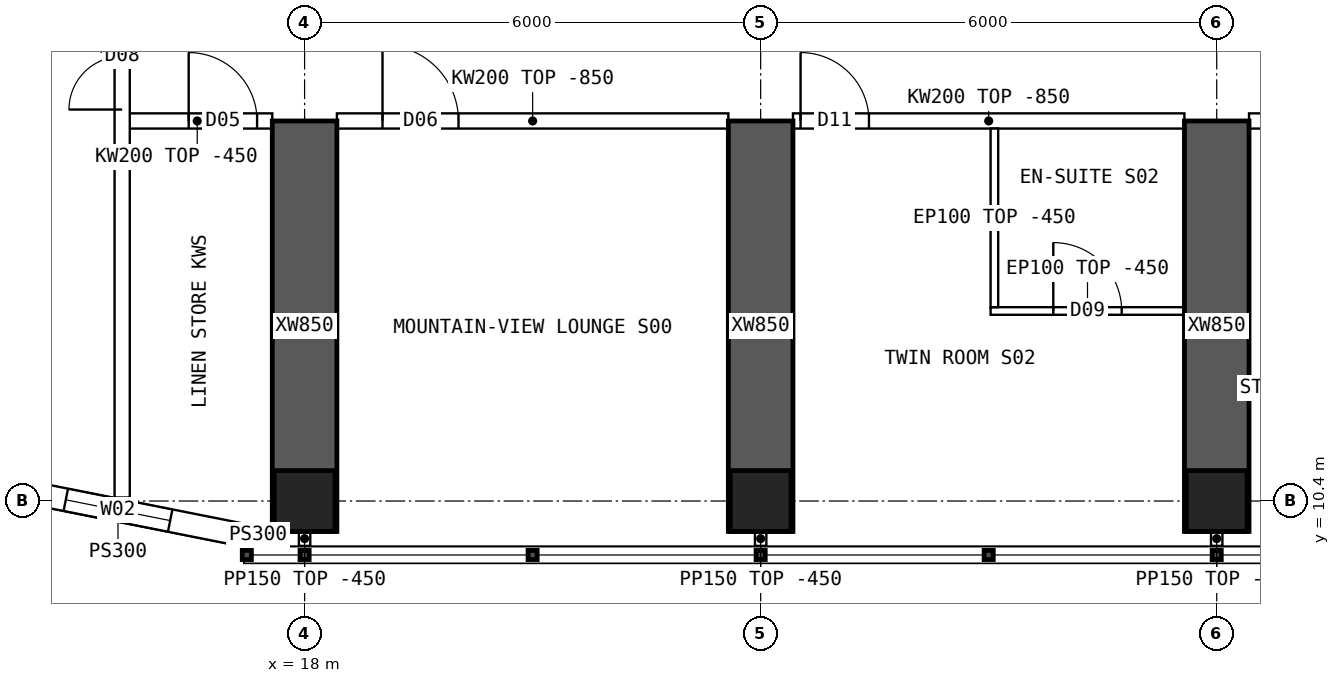
"""IFC4 building model, lengths in metres.
Left out: names, types, materials, properties, quantities, classifications, styles, units other than length and angle.
Written with IfcOpenShell. Run it as: python <this file> out.ifc"""

import sys

from ifc_helpers import new_model, si_unit, direction, frame, frame_2d, origin, origin_2d, place, context, subcontext, project, spatial, polyline, rectangle, hollow_rectangle, outline, extrude, element, fill, save


model = new_model("IFC4")
c1 = context("Model", 3, precision=1e-05, world=origin(), true_north=direction((0.0, 1.0)))
c2 = subcontext(c1, "Body", "Model", "MODEL_VIEW")
j1 = project(units=[si_unit("LENGTHUNIT", "METRE"), si_unit("PLANEANGLEUNIT", "RADIAN")], contexts=[c1])
p1 = place(None, origin())
s1 = spatial("IfcSite", under=j1, at=p1, CompositionType="ELEMENT")
p2 = place(p1, origin())
s2 = spatial("IfcBuilding", under=s1, at=p2, CompositionType="ELEMENT")
p3 = place(p2, frame((0.0, 0.0, 144.85)))
s3 = spatial("IfcBuildingStorey", under=s2, at=p3, CompositionType="ELEMENT", Elevation=144.85)
for number, where, z_axis, x_axis in (
    (1, (18.0, 10.4, 0.0), (0.0, 0.0, 1.0), (1.0, 0.0, 0.0)),
    (2, (24.0, 10.4, 0.0), (0.0, 0.0, 1.0), (1.0, 0.0, 0.0)),
    (3, (30.0, 10.4, 0.0), (0.0, 0.0, 1.0), (1.0, 0.0, 0.0)),
):
    element("IfcColumn", number, at=place(p3, frame(where, z_axis=z_axis, x_axis=x_axis)), inside=s3, PredefinedType="COLUMN", context=c2, shape_type="SweptSolid", body=[
        extrude(hollow_rectangle(XDim=0.8, YDim=0.8, WallThickness=0.08, at=origin_2d()), origin(), (0.0, 0.0, 1.0), 3.75),
    ])
for number, where, z_axis, x_axis in (
    (4, (18.0, 10.0, 0.0), (0.0, 0.0, 1.0), (0.0, 1.0, 0.0)),
    (5, (24.0, 10.0, 0.0), (0.0, 0.0, 1.0), (0.0, 1.0, 0.0)),
    (6, (30.0, 10.0, 0.0), (0.0, 0.0, 1.0), (0.0, 1.0, 0.0)),
):
    element("IfcWall", number, at=place(p3, frame(where, z_axis=z_axis, x_axis=x_axis)), inside=s3, PredefinedType="SHEAR", context=c2, shape_type="SweptSolid", body=[
        extrude(rectangle(XDim=5.4, YDim=0.85, at=frame_2d((2.7, 0.0))), origin(), (0.0, 0.0, 1.0), 3.75),
    ])
p4 = place(p3, frame((13.89, 10.608, 0.0), z_axis=(0.0, 0.0, 1.0), x_axis=(0.98078325777, -0.195100490205, 0.0)))
e7 = element("IfcWall", 7, at=p4, inside=s3, PredefinedType="SOLIDWALL", context=c2, shape_type="SweptSolid", body=[
    extrude(outline(polyline([(-0.03, -0.15), (3.405, -0.15), (3.345, 0.15), (0.03, 0.15), (-0.03, -0.15)])), origin(), (0.0, 0.0, 1.0), 3.3),
])
p5 = place(p4, frame((0.988, 0.0, 0.9)))
e8 = element("IfcOpeningElement", 8, at=p5, cuts=e7, PredefinedType="OPENING", context=c2, shape_type="SweptSolid", body=[
    extrude(rectangle(XDim=1.4, YDim=1.8, at=frame_2d((0.7, 0.9))), frame((0.0, 0.16, 0.0), z_axis=(0.0, -1.0, 0.0), x_axis=(1.0, 0.0, 0.0)), (0.0, 0.0, 1.0), 0.32),
])
p6 = place(p3, frame((17.2, 9.95, 0.0), z_axis=(0.0, 0.0, 1.0), x_axis=(1.0, 0.0, 0.0)))
e9 = element("IfcWall", 9, at=p6, inside=s3, PredefinedType="SOLIDWALL", context=c2, shape_type="SweptSolid", body=[
    extrude(rectangle(XDim=0.375, YDim=0.3, at=frame_2d((0.188, 0.0))), origin(), (0.0, 0.0, 1.0), 3.3),
])
p7 = place(p3, frame((15.6, 15.4, 0.0), z_axis=(0.0, 0.0, 1.0), x_axis=(1.0, 0.0, 0.0)))
e10 = element("IfcWall", 10, at=p7, inside=s3, PredefinedType="SOLIDWALL", context=c2, shape_type="SweptSolid", body=[
    extrude(rectangle(XDim=1.975, YDim=0.2, at=frame_2d((0.987, 0.0))), origin(), (0.0, 0.0, 1.0), 3.3),
])
p8 = place(p7, frame((0.875, 0.0, 0.0)))
e11 = element("IfcOpeningElement", 11, at=p8, cuts=e10, PredefinedType="OPENING", context=c2, shape_type="SweptSolid", body=[
    extrude(rectangle(XDim=0.9, YDim=2.1, at=frame_2d((0.45, 1.05))), frame((0.0, 0.11, 0.0), z_axis=(0.0, -1.0, 0.0), x_axis=(1.0, 0.0, 0.0)), (0.0, 0.0, 1.0), 0.22),
])
p9 = place(p3, frame((18.425, 15.4, 0.0), z_axis=(0.0, 0.0, 1.0), x_axis=(1.0, 0.0, 0.0)))
e12 = element("IfcWall", 12, at=p9, inside=s3, PredefinedType="SOLIDWALL", context=c2, shape_type="SweptSolid", body=[
    extrude(outline(polyline([(0.0, 0.0), (5.15, 0.0), (5.15, 2.9), (0.0, 2.9), (0.0, 0.0)])), frame((0.0, 0.1, 0.0), z_axis=(0.0, -1.0, 0.0), x_axis=(1.0, 0.0, 0.0)), (0.0, 0.0, 1.0), 0.2),
])
p10 = place(p9, frame((0.6, 0.0, 0.0)))
e13 = element("IfcOpeningElement", 13, at=p10, cuts=e12, PredefinedType="OPENING", context=c2, shape_type="SweptSolid", body=[
    extrude(rectangle(XDim=1.0, YDim=2.1, at=frame_2d((0.5, 1.05))), frame((0.0, 0.11, 0.0), z_axis=(0.0, -1.0, 0.0), x_axis=(1.0, 0.0, 0.0)), (0.0, 0.0, 1.0), 0.22),
])
p11 = place(p3, frame((24.425, 15.4, 0.0), z_axis=(0.0, 0.0, 1.0), x_axis=(1.0, 0.0, 0.0)))
e14 = element("IfcWall", 14, at=p11, inside=s3, PredefinedType="SOLIDWALL", context=c2, shape_type="SweptSolid", body=[
    extrude(outline(polyline([(0.0, 0.0), (5.15, 0.0), (5.15, 2.9), (0.0, 2.9), (0.0, 0.0)])), frame((0.0, 0.1, 0.0), z_axis=(0.0, -1.0, 0.0), x_axis=(1.0, 0.0, 0.0)), (0.0, 0.0, 1.0), 0.2),
])
p12 = place(p11, frame((0.1, 0.0, 0.0)))
e15 = element("IfcOpeningElement", 15, at=p12, cuts=e14, PredefinedType="OPENING", context=c2, shape_type="SweptSolid", body=[
    extrude(rectangle(XDim=0.9, YDim=2.1, at=frame_2d((0.45, 1.05))), frame((0.0, 0.11, 0.0), z_axis=(0.0, -1.0, 0.0), x_axis=(1.0, 0.0, 0.0)), (0.0, 0.0, 1.0), 0.22),
])
p13 = place(p3, frame((30.425, 15.4, 0.0), z_axis=(0.0, 0.0, 1.0), x_axis=(1.0, 0.0, 0.0)))
e16 = element("IfcWall", 16, at=p13, inside=s3, PredefinedType="SOLIDWALL", context=c2, shape_type="SweptSolid", body=[
    extrude(outline(polyline([(0.0, 0.0), (5.15, 0.0), (5.15, 2.9), (0.0, 2.9), (0.0, 0.0)])), frame((0.0, 0.1, 0.0), z_axis=(0.0, -1.0, 0.0), x_axis=(1.0, 0.0, 0.0)), (0.0, 0.0, 1.0), 0.2),
])
p14 = place(p13, frame((2.3, 0.0, 0.0)))
e17 = element("IfcOpeningElement", 17, at=p14, cuts=e16, PredefinedType="OPENING", context=c2, shape_type="SweptSolid", body=[
    extrude(rectangle(XDim=0.9, YDim=2.1, at=frame_2d((0.45, 1.05))), frame((0.0, 0.11, 0.0), z_axis=(0.0, -1.0, 0.0), x_axis=(1.0, 0.0, 0.0)), (0.0, 0.0, 1.0), 0.22),
])
p15 = place(p3, frame((29.575, 12.9, 0.0), z_axis=(0.0, 0.0, 1.0), x_axis=(-1.0, 0.0, 0.0)))
e18 = element("IfcWall", 18, at=p15, inside=s3, PredefinedType="PARTITIONING", context=c2, shape_type="SweptSolid", body=[
    extrude(rectangle(XDim=2.55, YDim=0.1, at=frame_2d((1.275, 0.0))), origin(), (0.0, 0.0, 1.0), 3.3),
])
p16 = place(p15, frame((0.825, 0.0, 0.0)))
e19 = element("IfcOpeningElement", 19, at=p16, cuts=e18, PredefinedType="OPENING", context=c2, shape_type="SweptSolid", body=[
    extrude(rectangle(XDim=0.9, YDim=2.1, at=frame_2d((0.45, 1.05))), frame((0.0, 0.06, 0.0), z_axis=(0.0, -1.0, 0.0), x_axis=(1.0, 0.0, 0.0)), (0.0, 0.0, 1.0), 0.12),
])
p17 = place(p3, frame((27.075, 12.95, 0.0), z_axis=(0.0, 0.0, 1.0), x_axis=(0.0, 1.0, 0.0)))
e20 = element("IfcWall", 20, at=p17, inside=s3, PredefinedType="PARTITIONING", context=c2, shape_type="SweptSolid", body=[
    extrude(outline(polyline([(0.0, 0.0), (2.35, 0.0), (2.35, 2.9), (2.302, 2.9), (2.3, 3.3), (0.0, 3.3), (0.0, 0.0)])), frame((0.0, 0.05, 0.0), z_axis=(0.0, -1.0, 0.0), x_axis=(1.0, 0.0, 0.0)), (0.0, 0.0, 1.0), 0.1),
])
p18 = place(p3, frame((15.6, 10.446, 0.0), z_axis=(0.0, 0.0, 1.0), x_axis=(0.0, 1.0, 0.0)))
e21 = element("IfcWall", 21, at=p18, inside=s3, PredefinedType="SOLIDWALL", context=c2, shape_type="SweptSolid", body=[
    extrude(rectangle(XDim=43.107, YDim=0.2, at=frame_2d((21.554, 0.0))), origin(), (0.0, 0.0, 1.0), 3.3),
])
p19 = place(p18, frame((5.104, 0.0, 0.0)))
e22 = element("IfcOpeningElement", 22, at=p19, cuts=e21, PredefinedType="OPENING", context=c2, shape_type="SweptSolid", body=[
    extrude(rectangle(XDim=1.4, YDim=2.1, at=frame_2d((0.7, 1.05))), frame((0.0, 0.11, 0.0), z_axis=(0.0, -1.0, 0.0), x_axis=(1.0, 0.0, 0.0)), (0.0, 0.0, 1.0), 0.22),
])
p20 = place(p18, frame((36.504, 0.0, 0.0)))
e23 = element("IfcOpeningElement", 23, at=p20, cuts=e21, PredefinedType="OPENING", context=c2, shape_type="SweptSolid", body=[
    extrude(rectangle(XDim=1.4, YDim=2.1, at=frame_2d((0.7, 1.05))), frame((0.0, 0.11, 0.0), z_axis=(0.0, -1.0, 0.0), x_axis=(1.0, 0.0, 0.0)), (0.0, 0.0, 1.0), 0.22),
])
for number, where, z_axis, x_axis in (
    (24, (18.0, 10.0, 0.0), (0.0, 0.0, 1.0), (0.0, -1.0, 0.0)),
    (25, (24.0, 10.0, 0.0), (0.0, 0.0, 1.0), (0.0, -1.0, 0.0)),
    (26, (30.0, 10.0, 0.0), (0.0, 0.0, 1.0), (0.0, -1.0, 0.0)),
):
    element("IfcWall", number, at=place(p3, frame(where, z_axis=z_axis, x_axis=x_axis)), inside=s3, PredefinedType="PARTITIONING", context=c2, shape_type="SweptSolid", body=[
        extrude(rectangle(XDim=0.19, YDim=0.15, at=frame_2d((0.095, 0.0))), origin(), (0.0, 0.0, 1.0), 3.3),
    ])
p21 = place(p5, origin())
e27 = element("IfcWindow", 27, at=p21, inside=s3, PartitioningType="SINGLE_PANEL", PredefinedType="WINDOW", context=c2, shape_type="SweptSolid", body=[
    extrude(rectangle(XDim=1.4, YDim=1.8, at=frame_2d((0.7, 0.9))), frame((0.0, 0.03, 0.0), z_axis=(0.0, -1.0, 0.0), x_axis=(1.0, 0.0, 0.0)), (0.0, 0.0, 1.0), 0.06),
])
fill(e8, e27)
p22 = place(p10, origin())
e28 = element("IfcDoor", 28, at=p22, inside=s3, OperationType="SINGLE_SWING_LEFT", PredefinedType="DOOR", context=c2, shape_type="SweptSolid", body=[
    extrude(rectangle(XDim=1.0, YDim=2.1, at=frame_2d((0.5, 1.05))), frame((0.0, 0.025, 0.0), z_axis=(0.0, -1.0, 0.0), x_axis=(1.0, 0.0, 0.0)), (0.0, 0.0, 1.0), 0.05),
])
fill(e13, e28)
p23 = place(p16, origin())
e29 = element("IfcDoor", 29, at=p23, inside=s3, OperationType="SINGLE_SWING_RIGHT", PredefinedType="DOOR", context=c2, shape_type="SweptSolid", body=[
    extrude(rectangle(XDim=0.9, YDim=2.1, at=frame_2d((0.45, 1.05))), frame((0.0, 0.025, 0.0), z_axis=(0.0, -1.0, 0.0), x_axis=(1.0, 0.0, 0.0)), (0.0, 0.0, 1.0), 0.05),
])
fill(e19, e29)
p24 = place(p12, origin())
e30 = element("IfcDoor", 30, at=p24, inside=s3, OperationType="SINGLE_SWING_LEFT", PredefinedType="DOOR", context=c2, shape_type="SweptSolid", body=[
    extrude(rectangle(XDim=0.9, YDim=2.1, at=frame_2d((0.45, 1.05))), frame((0.0, 0.025, 0.0), z_axis=(0.0, -1.0, 0.0), x_axis=(1.0, 0.0, 0.0)), (0.0, 0.0, 1.0), 0.05),
])
fill(e15, e30)
p25 = place(p19, origin())
e31 = element("IfcDoor", 31, at=p25, inside=s3, OperationType="DOUBLE_DOOR_SINGLE_SWING", PredefinedType="DOOR", context=c2, shape_type="SweptSolid", body=[
    extrude(rectangle(XDim=1.4, YDim=2.1, at=frame_2d((0.7, 1.05))), frame((0.0, 0.025, 0.0), z_axis=(0.0, -1.0, 0.0), x_axis=(1.0, 0.0, 0.0)), (0.0, 0.0, 1.0), 0.05),
])
fill(e22, e31)
p26 = place(p8, origin())
e32 = element("IfcDoor", 32, at=p26, inside=s3, OperationType="SINGLE_SWING_LEFT", PredefinedType="DOOR", context=c2, shape_type="SweptSolid", body=[
    extrude(rectangle(XDim=0.9, YDim=2.1, at=frame_2d((0.45, 1.05))), frame((0.0, 0.025, 0.0), z_axis=(0.0, -1.0, 0.0), x_axis=(1.0, 0.0, 0.0)), (0.0, 0.0, 1.0), 0.05),
])
fill(e11, e32)
save(model, sys.argv[1])
